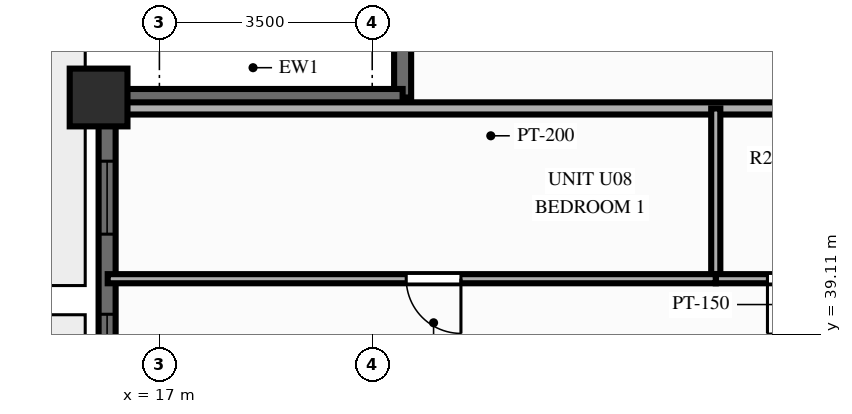
"""IFC4 building model, lengths in metres.
Left out: names, types, materials, properties, quantities, classifications, styles, units other than length and angle.
Written with IfcOpenShell. Run it as: python <this file> out.ifc"""

import sys

from ifc_helpers import new_model, si_unit, direction, frame, frame_2d, origin, origin_2d, place, context, subcontext, project, spatial, rectangle, extrude, source, transform, mapped, element, fill, save


model = new_model("IFC4")
c1 = context("Model", 3, precision=1e-05, world=origin(), true_north=direction((0.0, 1.0)))
c2 = subcontext(c1, "Body", "Model", "MODEL_VIEW")
j1 = project(units=[si_unit("LENGTHUNIT", "METRE"), si_unit("PLANEANGLEUNIT", "RADIAN")], contexts=[c1])
p1 = place(None, origin())
s1 = spatial("IfcSite", under=j1, at=p1, CompositionType="ELEMENT")
p2 = place(p1, origin())
s2 = spatial("IfcBuilding", under=s1, at=p2, CompositionType="ELEMENT")
p3 = place(p2, frame((0.0, 0.0, 152.2)))
s3 = spatial("IfcBuildingStorey", under=s2, at=p3, CompositionType="ELEMENT", Elevation=152.2)
m1 = source(origin(), c2, "Body", "SweptSolid", [
    extrude(rectangle(XDim=0.95, YDim=0.95, at=origin_2d()), origin(), (0.0, 0.0, 1.0), 3.9),
])
p4 = place(p3, frame((16.0, 43.0, 0.0), z_axis=(0.0, 0.0, 1.0), x_axis=(1.0, 0.0, 0.0)))
e1 = element("IfcColumn", 1, at=p4, inside=s3, PredefinedType="COLUMN", context=c2, shape_type="MappedRepresentation", body=[
    mapped(m1, transform((0.0, 0.0, 0.0), scale=1.0)),
])
p5 = place(p3, frame((16.14, 11.0, 0.0), z_axis=(0.0, 0.0, 1.0), x_axis=(0.0, 1.0, 0.0)))
e2 = element("IfcWall", 2, at=p5, inside=s3, PredefinedType="SOLIDWALL", context=c2, shape_type="SweptSolid", body=[
    extrude(rectangle(XDim=32.0, YDim=0.28, at=frame_2d((16.0, 0.0))), origin(), (0.0, 0.0, 1.0), 2.44),
])
p6 = place(p5, frame((0.748, 0.0, 0.25)))
e3 = element("IfcOpeningElement", 3, at=p6, cuts=e2, PredefinedType="OPENING", context=c2, shape_type="SweptSolid", body=[
    extrude(rectangle(XDim=1.2, YDim=1.5, at=frame_2d((0.6, 0.75))), frame((0.0, 0.152, 0.0), z_axis=(0.0, -1.0, 0.0), x_axis=(1.0, 0.0, 0.0)), (0.0, 0.0, 1.0), 0.304),
])
p7 = place(p5, frame((2.965, 0.0, 0.25)))
e4 = element("IfcOpeningElement", 4, at=p7, cuts=e2, PredefinedType="OPENING", context=c2, shape_type="SweptSolid", body=[
    extrude(rectangle(XDim=1.2, YDim=1.5, at=frame_2d((0.6, 0.75))), frame((0.0, 0.152, 0.0), z_axis=(0.0, -1.0, 0.0), x_axis=(1.0, 0.0, 0.0)), (0.0, 0.0, 1.0), 0.304),
])
p8 = place(p5, frame((5.117, 0.0, 0.25)))
e5 = element("IfcOpeningElement", 5, at=p8, cuts=e2, PredefinedType="OPENING", context=c2, shape_type="SweptSolid", body=[
    extrude(rectangle(XDim=1.2, YDim=1.5, at=frame_2d((0.6, 0.75))), frame((0.0, 0.152, 0.0), z_axis=(0.0, -1.0, 0.0), x_axis=(1.0, 0.0, 0.0)), (0.0, 0.0, 1.0), 0.304),
])
p9 = place(p5, frame((8.05, 0.0, 0.25)))
e6 = element("IfcOpeningElement", 6, at=p9, cuts=e2, PredefinedType="OPENING", context=c2, shape_type="SweptSolid", body=[
    extrude(rectangle(XDim=1.2, YDim=1.5, at=frame_2d((0.6, 0.75))), frame((0.0, 0.152, 0.0), z_axis=(0.0, -1.0, 0.0), x_axis=(1.0, 0.0, 0.0)), (0.0, 0.0, 1.0), 0.304),
])
p10 = place(p5, frame((10.335, 0.0, 0.25)))
e7 = element("IfcOpeningElement", 7, at=p10, cuts=e2, PredefinedType="OPENING", context=c2, shape_type="SweptSolid", body=[
    extrude(rectangle(XDim=1.2, YDim=1.5, at=frame_2d((0.6, 0.75))), frame((0.0, 0.152, 0.0), z_axis=(0.0, -1.0, 0.0), x_axis=(1.0, 0.0, 0.0)), (0.0, 0.0, 1.0), 0.304),
])
p11 = place(p5, frame((12.92, 0.0, 0.25)))
e8 = element("IfcOpeningElement", 8, at=p11, cuts=e2, PredefinedType="OPENING", context=c2, shape_type="SweptSolid", body=[
    extrude(rectangle(XDim=1.2, YDim=1.5, at=frame_2d((0.6, 0.75))), frame((0.0, 0.152, 0.0), z_axis=(0.0, -1.0, 0.0), x_axis=(1.0, 0.0, 0.0)), (0.0, 0.0, 1.0), 0.304),
])
p12 = place(p5, frame((15.4, 0.0, 0.25)))
e9 = element("IfcOpeningElement", 9, at=p12, cuts=e2, PredefinedType="OPENING", context=c2, shape_type="SweptSolid", body=[
    extrude(rectangle(XDim=1.2, YDim=1.5, at=frame_2d((0.6, 0.75))), frame((0.0, 0.152, 0.0), z_axis=(0.0, -1.0, 0.0), x_axis=(1.0, 0.0, 0.0)), (0.0, 0.0, 1.0), 0.304),
])
p13 = place(p5, frame((17.58, 0.0, 0.25)))
e10 = element("IfcOpeningElement", 10, at=p13, cuts=e2, PredefinedType="OPENING", context=c2, shape_type="SweptSolid", body=[
    extrude(rectangle(XDim=1.2, YDim=1.5, at=frame_2d((0.6, 0.75))), frame((0.0, 0.152, 0.0), z_axis=(0.0, -1.0, 0.0), x_axis=(1.0, 0.0, 0.0)), (0.0, 0.0, 1.0), 0.304),
])
p14 = place(p5, frame((19.865, 0.0, 0.25)))
e11 = element("IfcOpeningElement", 11, at=p14, cuts=e2, PredefinedType="OPENING", context=c2, shape_type="SweptSolid", body=[
    extrude(rectangle(XDim=1.2, YDim=1.5, at=frame_2d((0.6, 0.75))), frame((0.0, 0.152, 0.0), z_axis=(0.0, -1.0, 0.0), x_axis=(1.0, 0.0, 0.0)), (0.0, 0.0, 1.0), 0.304),
])
p15 = place(p5, frame((22.45, 0.0, 0.25)))
e12 = element("IfcOpeningElement", 12, at=p15, cuts=e2, PredefinedType="OPENING", context=c2, shape_type="SweptSolid", body=[
    extrude(rectangle(XDim=1.2, YDim=1.5, at=frame_2d((0.6, 0.75))), frame((0.0, 0.152, 0.0), z_axis=(0.0, -1.0, 0.0), x_axis=(1.0, 0.0, 0.0)), (0.0, 0.0, 1.0), 0.304),
])
p16 = place(p5, frame((25.633, 0.0, 0.25)))
e13 = element("IfcOpeningElement", 13, at=p16, cuts=e2, PredefinedType="OPENING", context=c2, shape_type="SweptSolid", body=[
    extrude(rectangle(XDim=0.7, YDim=1.5, at=frame_2d((0.35, 0.75))), frame((0.0, 0.152, 0.0), z_axis=(0.0, -1.0, 0.0), x_axis=(1.0, 0.0, 0.0)), (0.0, 0.0, 1.0), 0.304),
])
p17 = place(p5, frame((27.235, 0.0, 0.25)))
e14 = element("IfcOpeningElement", 14, at=p17, cuts=e2, PredefinedType="OPENING", context=c2, shape_type="SweptSolid", body=[
    extrude(rectangle(XDim=1.2, YDim=1.5, at=frame_2d((0.6, 0.75))), frame((0.0, 0.152, 0.0), z_axis=(0.0, -1.0, 0.0), x_axis=(1.0, 0.0, 0.0)), (0.0, 0.0, 1.0), 0.304),
])
p18 = place(p5, frame((29.752, 0.0, 0.25)))
e15 = element("IfcOpeningElement", 15, at=p18, cuts=e2, PredefinedType="OPENING", context=c2, shape_type="SweptSolid", body=[
    extrude(rectangle(XDim=1.2, YDim=1.5, at=frame_2d((0.6, 0.75))), frame((0.0, 0.152, 0.0), z_axis=(0.0, -1.0, 0.0), x_axis=(1.0, 0.0, 0.0)), (0.0, 0.0, 1.0), 0.304),
])
for number, where, z_axis, x_axis in (
    (16, (21.0, 43.0, 0.0), (0.0, 0.0, 1.0), (0.0, 1.0, 0.0)),
    (17, (16.08, 43.0, 0.0), (0.0, 0.0, 1.0), (1.0, 0.0, 0.0)),
):
    element("IfcWall", number, at=place(p3, frame(where, z_axis=z_axis, x_axis=x_axis)), inside=s3, PredefinedType="SOLIDWALL", context=c2, shape_type="SweptSolid", body=[
        extrude(rectangle(XDim=4.92, YDim=0.28, at=frame_2d((2.46, 0.0))), origin(), (0.0, 0.0, 1.0), 2.44),
    ])
p19 = place(p3, frame((28.75, 42.82, 0.0), z_axis=(0.0, 0.0, 1.0), x_axis=(-1.0, 0.0, 0.0)))
e18 = element("IfcWall", 18, at=p19, inside=s3, PredefinedType="PARTITIONING", context=c2, shape_type="SweptSolid", body=[
    extrude(rectangle(XDim=12.6, YDim=0.2, at=frame_2d((6.3, 0.0))), origin(), (0.0, 0.0, 1.0), 3.56),
])
p20 = place(p3, frame((26.15, 40.019, 0.0), z_axis=(0.0, 0.0, 1.0), x_axis=(0.0, 1.0, 0.0)))
e19 = element("IfcWall", 19, at=p20, inside=s3, PredefinedType="PARTITIONING", context=c2, shape_type="SweptSolid", body=[
    extrude(rectangle(XDim=2.801, YDim=0.15, at=frame_2d((1.4, 0.0))), origin(), (0.0, 0.0, 1.0), 3.56),
])
p21 = place(p3, frame((28.75, 40.019, 0.0), z_axis=(0.0, 0.0, 1.0), x_axis=(-1.0, 0.0, 0.0)))
e20 = element("IfcWall", 20, at=p21, inside=s3, PredefinedType="PARTITIONING", context=c2, shape_type="SweptSolid", body=[
    extrude(rectangle(XDim=2.6, YDim=0.15, at=frame_2d((1.3, 0.0))), origin(), (0.0, 0.0, 1.0), 3.56),
])
p22 = place(p21, frame((0.85, 0.0, 0.0)))
e21 = element("IfcOpeningElement", 21, at=p22, cuts=e20, PredefinedType="OPENING", context=c2, shape_type="SweptSolid", body=[
    extrude(rectangle(XDim=0.9, YDim=2.1, at=frame_2d((0.45, 1.05))), frame((0.0, 0.087, 0.0), z_axis=(0.0, -1.0, 0.0), x_axis=(1.0, 0.0, 0.0)), (0.0, 0.0, 1.0), 0.174),
])
p23 = place(p3, frame((26.15, 40.019, 0.0), z_axis=(0.0, 0.0, 1.0), x_axis=(-1.0, 0.0, 0.0)))
e22 = element("IfcWall", 22, at=p23, inside=s3, PredefinedType="PARTITIONING", context=c2, shape_type="SweptSolid", body=[
    extrude(rectangle(XDim=10.0, YDim=0.15, at=frame_2d((5.0, 0.0))), origin(), (0.0, 0.0, 1.0), 3.56),
])
p24 = place(p23, frame((4.191, 0.0, 0.0)))
e23 = element("IfcOpeningElement", 23, at=p24, cuts=e22, PredefinedType="OPENING", context=c2, shape_type="SweptSolid", body=[
    extrude(rectangle(XDim=0.9, YDim=2.1, at=frame_2d((0.45, 1.05))), frame((0.0, 0.087, 0.0), z_axis=(0.0, -1.0, 0.0), x_axis=(1.0, 0.0, 0.0)), (0.0, 0.0, 1.0), 0.174),
])
m2 = source(origin(), c2, "Body", "SweptSolid", [
    extrude(rectangle(XDim=1.2, YDim=1.5, at=frame_2d((0.6, 0.75))), frame((0.0, 0.03, 0.0), z_axis=(0.0, -1.0, 0.0), x_axis=(1.0, 0.0, 0.0)), (0.0, 0.0, 1.0), 0.06),
])
p25 = place(p17, origin())
e24 = element("IfcWindow", 24, at=p25, inside=s3, PartitioningType="SINGLE_PANEL", PredefinedType="WINDOW", context=c2, shape_type="MappedRepresentation", body=[
    mapped(m2, transform((0.0, 0.0, 0.0), scale=1.0)),
])
fill(e14, e24)
p26 = place(p18, origin())
e25 = element("IfcWindow", 25, at=p26, inside=s3, PartitioningType="SINGLE_PANEL", PredefinedType="WINDOW", context=c2, shape_type="MappedRepresentation", body=[
    mapped(m2, transform((0.0, 0.0, 0.0), scale=1.0)),
])
fill(e15, e25)
m3 = source(origin(), c2, "Body", "SweptSolid", [
    extrude(rectangle(XDim=0.9, YDim=2.1, at=frame_2d((0.45, 1.05))), frame((0.0, 0.025, 0.0), z_axis=(0.0, -1.0, 0.0), x_axis=(1.0, 0.0, 0.0)), (0.0, 0.0, 1.0), 0.05),
])
p27 = place(p22, origin())
e26 = element("IfcDoor", 26, at=p27, inside=s3, OperationType="SINGLE_SWING_RIGHT", PredefinedType="DOOR", context=c2, shape_type="MappedRepresentation", body=[
    mapped(m3, transform((0.0, 0.0, 0.0), scale=1.0)),
])
fill(e21, e26)
p28 = place(p24, origin())
e27 = element("IfcDoor", 27, at=p28, inside=s3, OperationType="SINGLE_SWING_LEFT", PredefinedType="DOOR", context=c2, shape_type="MappedRepresentation", body=[
    mapped(m3, transform((0.0, 0.0, 0.0), scale=1.0)),
])
fill(e23, e27)
save(model, sys.argv[1])
